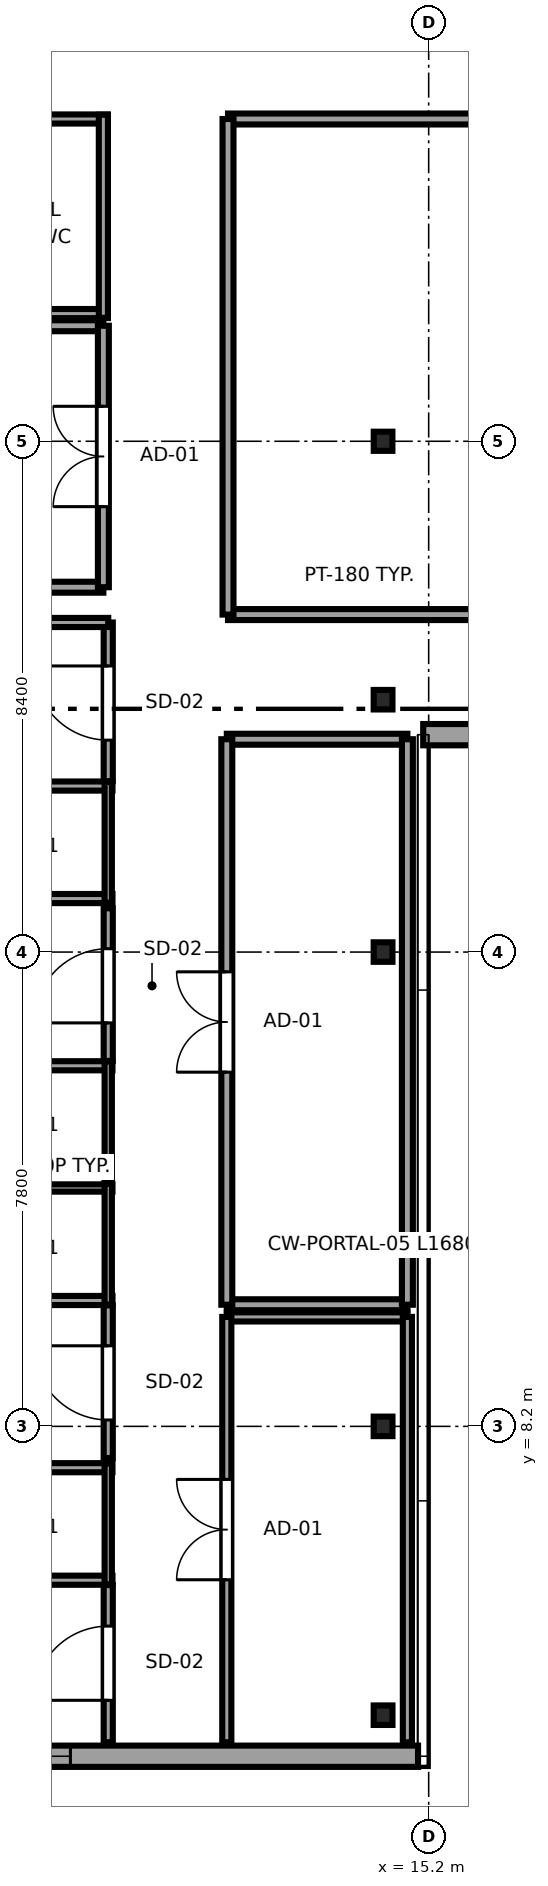
"""IFC4 building model, lengths in metres.
Left out: names, types, materials, properties, quantities, classifications, styles, units other than length and angle.
Written with IfcOpenShell. Run it as: python <this file> out.ifc"""

import sys

from ifc_helpers import new_model, si_unit, direction, frame, frame_2d, origin, origin_2d, place, context, subcontext, project, spatial, rectangle, i_section, extrude, source, transform, mapped, element, fill, save


model = new_model("IFC4")
c1 = context("Model", 3, precision=1e-05, world=origin(), true_north=direction((0.0, 1.0)))
c2 = subcontext(c1, "Body", "Model", "MODEL_VIEW")
j1 = project(units=[si_unit("LENGTHUNIT", "METRE"), si_unit("PLANEANGLEUNIT", "RADIAN")], contexts=[c1])
p1 = place(None, origin())
s1 = spatial("IfcSite", under=j1, at=p1, CompositionType="ELEMENT")
p2 = place(p1, origin())
s2 = spatial("IfcBuilding", under=s1, at=p2, CompositionType="ELEMENT")
p3 = place(p2, frame((0.0, 0.0, 248.75)))
s3 = spatial("IfcBuildingStorey", under=s2, at=p3, CompositionType="ELEMENT", Elevation=248.75)
m1 = source(origin(), c2, "Body", "SweptSolid", [
    extrude(i_section(OverallWidth=0.309, OverallDepth=0.321, WebThickness=0.014, FlangeThickness=0.022, FilletRadius=0.017, at=origin_2d()), origin(), (0.0, 0.0, 1.0), 3.55),
])
for number, where, z_axis, x_axis in (
    (1, (14.45, 3.45, 0.0), (0.0, 0.0, 1.0), (1.0, 0.0, 0.0)),
    (2, (14.45, 8.2, 0.0), (0.0, 0.0, 1.0), (1.0, 0.0, 0.0)),
    (3, (14.45, 16.0, 0.0), (0.0, 0.0, 1.0), (1.0, 0.0, 0.0)),
):
    element("IfcColumn", number, at=place(p3, frame(where, z_axis=z_axis, x_axis=x_axis)), inside=s3, PredefinedType="COLUMN", context=c2, shape_type="MappedRepresentation", body=[
        mapped(m1, transform((0.0, 0.0, 0.0), x_axis=(1.0, 0.0, 0.0), y_axis=(0.0, 1.0, 0.0), z_axis=(0.0, 0.0, 1.0), scale=1.0)),
    ])
m2 = source(origin(), c2, "Body", "SweptSolid", [
    extrude(i_section(OverallWidth=0.307, OverallDepth=0.315, WebThickness=0.012, FlangeThickness=0.019, FilletRadius=0.017, at=origin_2d()), origin(), (0.0, 0.0, 1.0), 3.55),
])
p4 = place(p3, frame((14.45, 24.4, 0.0), z_axis=(0.0, 0.0, 1.0), x_axis=(1.0, 0.0, 0.0)))
e4 = element("IfcColumn", 4, at=p4, inside=s3, PredefinedType="COLUMN", context=c2, shape_type="MappedRepresentation", body=[
    mapped(m2, transform((0.0, 0.0, 0.0), x_axis=(1.0, 0.0, 0.0), y_axis=(0.0, 1.0, 0.0), z_axis=(0.0, 0.0, 1.0), scale=1.0)),
])
p5 = place(p3, frame((14.45, 20.15, 0.0), z_axis=(0.0, 0.0, 1.0), x_axis=(1.0, 0.0, 0.0)))
e5 = element("IfcColumn", 5, at=p5, inside=s3, PredefinedType="COLUMN", context=c2, shape_type="MappedRepresentation", body=[
    mapped(m1, transform((0.0, 0.0, 0.0), x_axis=(1.0, 0.0, 0.0), y_axis=(0.0, 1.0, 0.0), z_axis=(0.0, 0.0, 1.0), scale=1.0)),
])
p6 = place(p3, frame((7.017, 2.775, 0.0), z_axis=(0.0, 0.0, 1.0), x_axis=(1.0, 0.0, 0.0)))
e6 = element("IfcWall", 6, at=p6, inside=s3, PredefinedType="SOLIDWALL", context=c2, shape_type="SweptSolid", body=[
    extrude(rectangle(XDim=8.008, YDim=0.35, at=frame_2d((4.004, 0.0))), origin(), (0.0, 0.0, 1.0), 3.37),
])
p7 = place(p6, frame((0.791, 0.0, 0.62)))
e7 = element("IfcOpeningElement", 7, at=p7, cuts=e6, PredefinedType="OPENING", context=c2, shape_type="SweptSolid", body=[
    extrude(rectangle(XDim=1.5, YDim=1.55, at=frame_2d((0.75, 0.775))), frame((0.0, 0.185, 0.0), z_axis=(0.0, -1.0, 0.0), x_axis=(1.0, 0.0, 0.0)), (0.0, 0.0, 1.0), 0.37),
])
p8 = place(p3, frame((15.11, 19.575, 0.0), z_axis=(0.0, 0.0, 1.0), x_axis=(1.0, 0.0, 0.0)))
e8 = element("IfcWall", 8, at=p8, inside=s3, PredefinedType="SOLIDWALL", context=c2, shape_type="SweptSolid", body=[
    extrude(rectangle(XDim=16.98, YDim=0.35, at=frame_2d((8.49, 0.0))), origin(), (0.0, 0.0, 1.0), 3.37),
])
p9 = place(p8, frame((1.88, 0.0, 0.68)))
e9 = element("IfcOpeningElement", 9, at=p9, cuts=e8, PredefinedType="OPENING", context=c2, shape_type="SweptSolid", body=[
    extrude(rectangle(XDim=2.7, YDim=1.95, at=frame_2d((1.35, 0.975))), frame((0.0, 0.185, 0.0), z_axis=(0.0, -1.0, 0.0), x_axis=(1.0, 0.0, 0.0)), (0.0, 0.0, 1.0), 0.37),
])
p10 = place(p8, frame((7.14, 0.0, 0.68)))
e10 = element("IfcOpeningElement", 10, at=p10, cuts=e8, PredefinedType="OPENING", context=c2, shape_type="SweptSolid", body=[
    extrude(rectangle(XDim=2.7, YDim=1.95, at=frame_2d((1.35, 0.975))), frame((0.0, 0.185, 0.0), z_axis=(0.0, -1.0, 0.0), x_axis=(1.0, 0.0, 0.0)), (0.0, 0.0, 1.0), 0.37),
])
p11 = place(p8, frame((12.4, 0.0, 0.68)))
e11 = element("IfcOpeningElement", 11, at=p11, cuts=e8, PredefinedType="OPENING", context=c2, shape_type="SweptSolid", body=[
    extrude(rectangle(XDim=2.7, YDim=1.95, at=frame_2d((1.35, 0.975))), frame((0.0, 0.185, 0.0), z_axis=(0.0, -1.0, 0.0), x_axis=(1.0, 0.0, 0.0)), (0.0, 0.0, 1.0), 0.37),
])
for number, where, z_axis, x_axis in (
    (12, (7.41, 5.67, 0.0), (0.0, 0.0, 1.0), (1.0, 0.0, 0.0)),
    (13, (7.41, 7.52, 0.0), (0.0, 0.0, 1.0), (1.0, 0.0, 0.0)),
):
    element("IfcWall", number, at=place(p3, frame(where, z_axis=z_axis, x_axis=x_axis)), inside=s3, PredefinedType="PARTITIONING", context=c2, shape_type="SweptSolid", body=[
        extrude(rectangle(XDim=2.59, YDim=0.15, at=frame_2d((1.295, 0.0))), origin(), (0.0, 0.0, 1.0), 3.37),
    ])
p12 = place(p3, frame((9.93, 5.6, 0.0), z_axis=(0.0, 0.0, 1.0), x_axis=(0.0, 1.0, 0.0)))
e14 = element("IfcWall", 14, at=p12, inside=s3, PredefinedType="PLUMBINGWALL", context=c2, shape_type="SweptSolid", body=[
    extrude(rectangle(XDim=1.99, YDim=0.12, at=frame_2d((0.995, 0.0))), origin(), (0.0, 0.0, 1.0), 3.37),
])
p13 = place(p3, frame((7.41, 10.27, 0.0), z_axis=(0.0, 0.0, 1.0), x_axis=(1.0, 0.0, 0.0)))
e15 = element("IfcWall", 15, at=p13, inside=s3, PredefinedType="PARTITIONING", context=c2, shape_type="SweptSolid", body=[
    extrude(rectangle(XDim=2.59, YDim=0.15, at=frame_2d((1.295, 0.0))), origin(), (0.0, 0.0, 1.0), 3.37),
])
p14 = place(p3, frame((7.41, 12.12, 0.0), z_axis=(0.0, 0.0, 1.0), x_axis=(1.0, 0.0, 0.0)))
e16 = element("IfcWall", 16, at=p14, inside=s3, PredefinedType="PLUMBINGWALL", context=c2, shape_type="SweptSolid", body=[
    extrude(rectangle(XDim=2.59, YDim=0.12, at=frame_2d((1.295, 0.0))), origin(), (0.0, 0.0, 1.0), 3.37),
])
p15 = place(p3, frame((9.93, 10.2, 0.0), z_axis=(0.0, 0.0, 1.0), x_axis=(0.0, 1.0, 0.0)))
e17 = element("IfcWall", 17, at=p15, inside=s3, PredefinedType="PLUMBINGWALL", context=c2, shape_type="SweptSolid", body=[
    extrude(rectangle(XDim=1.99, YDim=0.12, at=frame_2d((0.995, 0.0))), origin(), (0.0, 0.0, 1.0), 3.37),
])
p16 = place(p3, frame((7.41, 14.13, 0.0), z_axis=(0.0, 0.0, 1.0), x_axis=(1.0, 0.0, 0.0)))
e18 = element("IfcWall", 18, at=p16, inside=s3, PredefinedType="PARTITIONING", context=c2, shape_type="SweptSolid", body=[
    extrude(rectangle(XDim=2.59, YDim=0.15, at=frame_2d((1.295, 0.0))), origin(), (0.0, 0.0, 1.0), 3.37),
])
p17 = place(p3, frame((9.93, 12.21, 0.0), z_axis=(0.0, 0.0, 1.0), x_axis=(0.0, 1.0, 0.0)))
e19 = element("IfcWall", 19, at=p17, inside=s3, PredefinedType="PLUMBINGWALL", context=c2, shape_type="SweptSolid", body=[
    extrude(rectangle(XDim=1.99, YDim=0.12, at=frame_2d((0.995, 0.0))), origin(), (0.0, 0.0, 1.0), 3.37),
])
p18 = place(p3, frame((3.005, 16.88, 0.0), z_axis=(0.0, 0.0, 1.0), x_axis=(1.0, 0.0, 0.0)))
e20 = element("IfcWall", 20, at=p18, inside=s3, PredefinedType="PARTITIONING", context=c2, shape_type="SweptSolid", body=[
    extrude(rectangle(XDim=6.995, YDim=0.15, at=frame_2d((3.498, 0.0))), origin(), (0.0, 0.0, 1.0), 3.37),
])
p19 = place(p3, frame((7.41, 18.73, 0.0), z_axis=(0.0, 0.0, 1.0), x_axis=(1.0, 0.0, 0.0)))
e21 = element("IfcWall", 21, at=p19, inside=s3, PredefinedType="PARTITIONING", context=c2, shape_type="SweptSolid", body=[
    extrude(rectangle(XDim=2.59, YDim=0.15, at=frame_2d((1.295, 0.0))), origin(), (0.0, 0.0, 1.0), 3.37),
])
p20 = place(p3, frame((9.93, 16.81, 0.0), z_axis=(0.0, 0.0, 1.0), x_axis=(0.0, 1.0, 0.0)))
e22 = element("IfcWall", 22, at=p20, inside=s3, PredefinedType="PLUMBINGWALL", context=c2, shape_type="SweptSolid", body=[
    extrude(rectangle(XDim=1.99, YDim=0.12, at=frame_2d((0.995, 0.0))), origin(), (0.0, 0.0, 1.0), 3.37),
])
p21 = place(p3, frame((9.93, 3.005, 0.0), z_axis=(0.0, 0.0, 1.0), x_axis=(0.0, 1.0, 0.0)))
e23 = element("IfcWall", 23, at=p21, inside=s3, PredefinedType="PARTITIONING", context=c2, shape_type="SweptSolid", body=[
    extrude(rectangle(XDim=2.585, YDim=0.15, at=frame_2d((1.292, 0.0))), origin(), (0.0, 0.0, 1.0), 3.37),
])
p22 = place(p21, frame((0.69, 0.0, 0.0)))
e24 = element("IfcOpeningElement", 24, at=p22, cuts=e23, PredefinedType="OPENING", context=c2, shape_type="SweptSolid", body=[
    extrude(rectangle(XDim=1.22, YDim=2.08, at=frame_2d((0.61, 1.04))), frame((0.0, 0.085, 0.0), z_axis=(0.0, -1.0, 0.0), x_axis=(1.0, 0.0, 0.0)), (0.0, 0.0, 1.0), 0.17),
])
p23 = place(p3, frame((9.93, 7.68, 0.0), z_axis=(0.0, 0.0, 1.0), x_axis=(0.0, 1.0, 0.0)))
e25 = element("IfcWall", 25, at=p23, inside=s3, PredefinedType="PARTITIONING", context=c2, shape_type="SweptSolid", body=[
    extrude(rectangle(XDim=2.51, YDim=0.15, at=frame_2d((1.255, 0.0))), origin(), (0.0, 0.0, 1.0), 3.37),
])
p24 = place(p23, frame((0.625, 0.0, 0.0)))
e26 = element("IfcOpeningElement", 26, at=p24, cuts=e25, PredefinedType="OPENING", context=c2, shape_type="SweptSolid", body=[
    extrude(rectangle(XDim=1.22, YDim=2.08, at=frame_2d((0.61, 1.04))), frame((0.0, 0.085, 0.0), z_axis=(0.0, -1.0, 0.0), x_axis=(1.0, 0.0, 0.0)), (0.0, 0.0, 1.0), 0.17),
])
p25 = place(p3, frame((9.93, 14.21, 0.0), z_axis=(0.0, 0.0, 1.0), x_axis=(0.0, 1.0, 0.0)))
e27 = element("IfcWall", 27, at=p25, inside=s3, PredefinedType="PARTITIONING", context=c2, shape_type="SweptSolid", body=[
    extrude(rectangle(XDim=2.51, YDim=0.15, at=frame_2d((1.255, 0.0))), origin(), (0.0, 0.0, 1.0), 3.37),
])
p26 = place(p25, frame((0.625, 0.0, 0.0)))
e28 = element("IfcOpeningElement", 28, at=p26, cuts=e27, PredefinedType="OPENING", context=c2, shape_type="SweptSolid", body=[
    extrude(rectangle(XDim=1.22, YDim=2.08, at=frame_2d((0.61, 1.04))), frame((0.0, 0.085, 0.0), z_axis=(0.0, -1.0, 0.0), x_axis=(1.0, 0.0, 0.0)), (0.0, 0.0, 1.0), 0.17),
])
p27 = place(p3, frame((9.93, 18.81, 0.0), z_axis=(0.0, 0.0, 1.0), x_axis=(0.0, 1.0, 0.0)))
e29 = element("IfcWall", 29, at=p27, inside=s3, PredefinedType="PARTITIONING", context=c2, shape_type="SweptSolid", body=[
    extrude(rectangle(XDim=2.61, YDim=0.15, at=frame_2d((1.305, 0.0))), origin(), (0.0, 0.0, 1.0), 3.37),
])
p28 = place(p27, frame((0.675, 0.0, 0.0)))
e30 = element("IfcOpeningElement", 30, at=p28, cuts=e29, PredefinedType="OPENING", context=c2, shape_type="SweptSolid", body=[
    extrude(rectangle(XDim=1.22, YDim=2.08, at=frame_2d((0.61, 1.04))), frame((0.0, 0.085, 0.0), z_axis=(0.0, -1.0, 0.0), x_axis=(1.0, 0.0, 0.0)), (0.0, 0.0, 1.0), 0.17),
])
p29 = place(p3, frame((3.005, 21.42, 0.0), z_axis=(0.0, 0.0, 1.0), x_axis=(1.0, 0.0, 0.0)))
e31 = element("IfcWall", 31, at=p29, inside=s3, PredefinedType="PARTITIONING", context=c2, shape_type="SweptSolid", body=[
    extrude(rectangle(XDim=6.925, YDim=0.15, at=frame_2d((3.462, 0.0))), origin(), (0.0, 0.0, 1.0), 3.37),
])
for number, where, z_axis, x_axis in (
    (32, (11.88, 10.2, 0.0), (0.0, 0.0, 1.0), (1.0, 0.0, 0.0)),
    (33, (11.88, 19.5, 0.0), (0.0, 0.0, 1.0), (1.0, 0.0, 0.0)),
):
    element("IfcWall", number, at=place(p3, frame(where, z_axis=z_axis, x_axis=x_axis)), inside=s3, PredefinedType="PARTITIONING", context=c2, shape_type="SweptSolid", body=[
        extrude(rectangle(XDim=2.97, YDim=0.18, at=frame_2d((1.485, 0.0))), origin(), (0.0, 0.0, 1.0), 3.37),
    ])
p30 = place(p3, frame((11.88, 10.2, 0.0), z_axis=(0.0, 0.0, 1.0), x_axis=(0.0, 1.0, 0.0)))
e34 = element("IfcWall", 34, at=p30, inside=s3, PredefinedType="PARTITIONING", context=c2, shape_type="SweptSolid", body=[
    extrude(rectangle(XDim=9.3, YDim=0.18, at=frame_2d((4.65, 0.0))), origin(), (0.0, 0.0, 1.0), 3.37),
])
p31 = place(p30, frame((3.825, 0.0, 0.0)))
e35 = element("IfcOpeningElement", 35, at=p31, cuts=e34, PredefinedType="OPENING", context=c2, shape_type="SweptSolid", body=[
    extrude(rectangle(XDim=1.65, YDim=2.15, at=frame_2d((0.825, 1.075))), frame((0.0, 0.1, 0.0), z_axis=(0.0, -1.0, 0.0), x_axis=(1.0, 0.0, 0.0)), (0.0, 0.0, 1.0), 0.2),
])
p32 = place(p3, frame((14.85, 10.2, 0.0), z_axis=(0.0, 0.0, 1.0), x_axis=(0.0, 1.0, 0.0)))
e36 = element("IfcWall", 36, at=p32, inside=s3, PredefinedType="PARTITIONING", context=c2, shape_type="SweptSolid", body=[
    extrude(rectangle(XDim=9.3, YDim=0.18, at=frame_2d((4.65, 0.0))), origin(), (0.0, 0.0, 1.0), 3.37),
])
p33 = place(p3, frame((11.88, 10.0, 0.0), z_axis=(0.0, 0.0, 1.0), x_axis=(1.0, 0.0, 0.0)))
e37 = element("IfcWall", 37, at=p33, inside=s3, PredefinedType="PARTITIONING", context=c2, shape_type="SweptSolid", body=[
    extrude(rectangle(XDim=2.97, YDim=0.15, at=frame_2d((1.485, 0.0))), origin(), (0.0, 0.0, 1.0), 3.37),
])
p34 = place(p3, frame((11.88, 3.005, 0.0), z_axis=(0.0, 0.0, 1.0), x_axis=(0.0, 1.0, 0.0)))
e38 = element("IfcWall", 38, at=p34, inside=s3, PredefinedType="PARTITIONING", context=c2, shape_type="SweptSolid", body=[
    extrude(rectangle(XDim=6.995, YDim=0.15, at=frame_2d((3.498, 0.0))), origin(), (0.0, 0.0, 1.0), 3.37),
])
p35 = place(p34, frame((2.673, 0.0, 0.0)))
e39 = element("IfcOpeningElement", 39, at=p35, cuts=e38, PredefinedType="OPENING", context=c2, shape_type="SweptSolid", body=[
    extrude(rectangle(XDim=1.65, YDim=2.15, at=frame_2d((0.825, 1.075))), frame((0.0, 0.085, 0.0), z_axis=(0.0, -1.0, 0.0), x_axis=(1.0, 0.0, 0.0)), (0.0, 0.0, 1.0), 0.17),
])
p36 = place(p3, frame((14.85, 3.005, 0.0), z_axis=(0.0, 0.0, 1.0), x_axis=(0.0, 1.0, 0.0)))
e40 = element("IfcWall", 40, at=p36, inside=s3, PredefinedType="PARTITIONING", context=c2, shape_type="SweptSolid", body=[
    extrude(rectangle(XDim=6.995, YDim=0.15, at=frame_2d((3.498, 0.0))), origin(), (0.0, 0.0, 1.0), 3.37),
])
p37 = place(p3, frame((11.9, 21.55, 0.0), z_axis=(0.0, 0.0, 1.0), x_axis=(1.0, 0.0, 0.0)))
e41 = element("IfcWall", 41, at=p37, inside=s3, PredefinedType="PARTITIONING", context=c2, shape_type="SweptSolid", body=[
    extrude(rectangle(XDim=10.3, YDim=0.18, at=frame_2d((5.15, 0.0))), origin(), (0.0, 0.0, 1.0), 3.37),
])
p38 = place(p37, frame((4.325, 0.0, 0.0)))
e42 = element("IfcOpeningElement", 42, at=p38, cuts=e41, PredefinedType="OPENING", context=c2, shape_type="SweptSolid", body=[
    extrude(rectangle(XDim=1.65, YDim=2.15, at=frame_2d((0.825, 1.075))), frame((0.0, 0.1, 0.0), z_axis=(0.0, -1.0, 0.0), x_axis=(1.0, 0.0, 0.0)), (0.0, 0.0, 1.0), 0.2),
])
p39 = place(p3, frame((11.9, 29.7, 0.0), z_axis=(0.0, 0.0, 1.0), x_axis=(1.0, 0.0, 0.0)))
e43 = element("IfcWall", 43, at=p39, inside=s3, PredefinedType="PARTITIONING", context=c2, shape_type="SweptSolid", body=[
    extrude(rectangle(XDim=10.3, YDim=0.18, at=frame_2d((5.15, 0.0))), origin(), (0.0, 0.0, 1.0), 3.37),
])
p40 = place(p3, frame((11.9, 21.55, 0.0), z_axis=(0.0, 0.0, 1.0), x_axis=(0.0, 1.0, 0.0)))
e44 = element("IfcWall", 44, at=p40, inside=s3, PredefinedType="PARTITIONING", context=c2, shape_type="SweptSolid", body=[
    extrude(rectangle(XDim=8.15, YDim=0.18, at=frame_2d((4.075, 0.0))), origin(), (0.0, 0.0, 1.0), 3.37),
])
for number, where, z_axis, x_axis in (
    (45, (3.005, 22.0, 0.0), (0.0, 0.0, 1.0), (1.0, 0.0, 0.0)),
    (46, (3.005, 26.3, 0.0), (0.0, 0.0, 1.0), (1.0, 0.0, 0.0)),
):
    element("IfcWall", number, at=place(p3, frame(where, z_axis=z_axis, x_axis=x_axis)), inside=s3, PredefinedType="PARTITIONING", context=c2, shape_type="SweptSolid", body=[
        extrude(rectangle(XDim=6.845, YDim=0.18, at=frame_2d((3.423, 0.0))), origin(), (0.0, 0.0, 1.0), 3.37),
    ])
p41 = place(p3, frame((9.85, 22.0, 0.0), z_axis=(0.0, 0.0, 1.0), x_axis=(0.0, 1.0, 0.0)))
e47 = element("IfcWall", 47, at=p41, inside=s3, PredefinedType="PARTITIONING", context=c2, shape_type="SweptSolid", body=[
    extrude(rectangle(XDim=4.3, YDim=0.18, at=frame_2d((2.15, 0.0))), origin(), (0.0, 0.0, 1.0), 3.37),
])
p42 = place(p41, frame((1.325, 0.0, 0.0)))
e48 = element("IfcOpeningElement", 48, at=p42, cuts=e47, PredefinedType="OPENING", context=c2, shape_type="SweptSolid", body=[
    extrude(rectangle(XDim=1.65, YDim=2.15, at=frame_2d((0.825, 1.075))), frame((0.0, 0.1, 0.0), z_axis=(0.0, -1.0, 0.0), x_axis=(1.0, 0.0, 0.0)), (0.0, 0.0, 1.0), 0.2),
])
p43 = place(p3, frame((6.13, 26.5, 0.0), z_axis=(0.0, 0.0, 1.0), x_axis=(1.0, 0.0, 0.0)))
e49 = element("IfcWall", 49, at=p43, inside=s3, PredefinedType="PARTITIONING", context=c2, shape_type="SweptSolid", body=[
    extrude(rectangle(XDim=3.79, YDim=0.15, at=frame_2d((1.895, 0.0))), origin(), (0.0, 0.0, 1.0), 3.37),
])
p44 = place(p3, frame((6.13, 29.7, 0.0), z_axis=(0.0, 0.0, 1.0), x_axis=(1.0, 0.0, 0.0)))
e50 = element("IfcWall", 50, at=p44, inside=s3, PredefinedType="PARTITIONING", context=c2, shape_type="SweptSolid", body=[
    extrude(rectangle(XDim=3.79, YDim=0.15, at=frame_2d((1.895, 0.0))), origin(), (0.0, 0.0, 1.0), 3.37),
])
p45 = place(p44, frame((1.435, 0.0, 0.0)))
e51 = element("IfcOpeningElement", 51, at=p45, cuts=e50, PredefinedType="OPENING", context=c2, shape_type="SweptSolid", body=[
    extrude(rectangle(XDim=0.92, YDim=2.01, at=frame_2d((0.46, 1.005))), frame((0.0, 0.085, 0.0), z_axis=(0.0, -1.0, 0.0), x_axis=(1.0, 0.0, 0.0)), (0.0, 0.0, 1.0), 0.17),
])
p46 = place(p3, frame((9.85, 26.43, 0.0), z_axis=(0.0, 0.0, 1.0), x_axis=(0.0, 1.0, 0.0)))
e52 = element("IfcWall", 52, at=p46, inside=s3, PredefinedType="PARTITIONING", context=c2, shape_type="SweptSolid", body=[
    extrude(rectangle(XDim=3.34, YDim=0.15, at=frame_2d((1.67, 0.0))), origin(), (0.0, 0.0, 1.0), 3.37),
])
m3 = source(origin(), c2, "Body", "SweptSolid", [
    extrude(rectangle(XDim=1.5, YDim=1.55, at=frame_2d((0.75, 0.775))), frame((0.0, 0.09, 0.0), z_axis=(0.0, -1.0, 0.0), x_axis=(1.0, 0.0, 0.0)), (0.0, 0.0, 1.0), 0.06),
])
p47 = place(p7, origin())
e53 = element("IfcWindow", 53, at=p47, inside=s3, PartitioningType="SINGLE_PANEL", PredefinedType="WINDOW", context=c2, shape_type="MappedRepresentation", body=[
    mapped(m3, transform((0.0, 0.0, 0.0), x_axis=(1.0, 0.0, 0.0), y_axis=(0.0, 1.0, 0.0), z_axis=(0.0, 0.0, 1.0), scale=1.0)),
])
fill(e7, e53)
m4 = source(origin(), c2, "Body", "SweptSolid", [
    extrude(rectangle(XDim=1.22, YDim=2.08, at=frame_2d((0.61, 1.04))), frame((0.0, 0.025, 0.0), z_axis=(0.0, -1.0, 0.0), x_axis=(1.0, 0.0, 0.0)), (0.0, 0.0, 1.0), 0.05),
])
p48 = place(p22, origin())
e54 = element("IfcDoor", 54, at=p48, inside=s3, OperationType="SINGLE_SWING_LEFT", PredefinedType="DOOR", context=c2, shape_type="MappedRepresentation", body=[
    mapped(m4, transform((0.0, 0.0, 0.0), x_axis=(1.0, 0.0, 0.0), y_axis=(0.0, 1.0, 0.0), z_axis=(0.0, 0.0, 1.0), scale=1.0)),
])
fill(e24, e54)
p49 = place(p24, origin())
e55 = element("IfcDoor", 55, at=p49, inside=s3, OperationType="SINGLE_SWING_RIGHT", PredefinedType="DOOR", context=c2, shape_type="MappedRepresentation", body=[
    mapped(m4, transform((0.0, 0.0, 0.0), x_axis=(1.0, 0.0, 0.0), y_axis=(0.0, 1.0, 0.0), z_axis=(0.0, 0.0, 1.0), scale=1.0)),
])
fill(e26, e55)
p50 = place(p26, origin())
e56 = element("IfcDoor", 56, at=p50, inside=s3, OperationType="SINGLE_SWING_LEFT", PredefinedType="DOOR", context=c2, shape_type="MappedRepresentation", body=[
    mapped(m4, transform((0.0, 0.0, 0.0), x_axis=(1.0, 0.0, 0.0), y_axis=(0.0, 1.0, 0.0), z_axis=(0.0, 0.0, 1.0), scale=1.0)),
])
fill(e28, e56)
p51 = place(p28, origin())
e57 = element("IfcDoor", 57, at=p51, inside=s3, OperationType="SINGLE_SWING_RIGHT", PredefinedType="DOOR", context=c2, shape_type="MappedRepresentation", body=[
    mapped(m4, transform((0.0, 0.0, 0.0), x_axis=(1.0, 0.0, 0.0), y_axis=(0.0, 1.0, 0.0), z_axis=(0.0, 0.0, 1.0), scale=1.0)),
])
fill(e30, e57)
m5 = source(origin(), c2, "Body", "SweptSolid", [
    extrude(rectangle(XDim=1.65, YDim=2.15, at=frame_2d((0.825, 1.075))), frame((0.0, 0.025, 0.0), z_axis=(0.0, -1.0, 0.0), x_axis=(1.0, 0.0, 0.0)), (0.0, 0.0, 1.0), 0.05),
])
p52 = place(p31, origin())
e58 = element("IfcDoor", 58, at=p52, inside=s3, OperationType="DOUBLE_DOOR_SINGLE_SWING", PredefinedType="DOOR", context=c2, shape_type="MappedRepresentation", body=[
    mapped(m5, transform((0.0, 0.0, 0.0), x_axis=(1.0, 0.0, 0.0), y_axis=(0.0, 1.0, 0.0), z_axis=(0.0, 0.0, 1.0), scale=1.0)),
])
fill(e35, e58)
p53 = place(p35, origin())
e59 = element("IfcDoor", 59, at=p53, inside=s3, OperationType="DOUBLE_DOOR_SINGLE_SWING", PredefinedType="DOOR", context=c2, shape_type="MappedRepresentation", body=[
    mapped(m5, transform((0.0, 0.0, 0.0), x_axis=(1.0, 0.0, 0.0), y_axis=(0.0, 1.0, 0.0), z_axis=(0.0, 0.0, 1.0), scale=1.0)),
])
fill(e39, e59)
p54 = place(p42, origin())
e60 = element("IfcDoor", 60, at=p54, inside=s3, OperationType="DOUBLE_DOOR_SINGLE_SWING", PredefinedType="DOOR", context=c2, shape_type="MappedRepresentation", body=[
    mapped(m5, transform((0.0, 0.0, 0.0), x_axis=(1.0, 0.0, 0.0), y_axis=(0.0, 1.0, 0.0), z_axis=(0.0, 0.0, 1.0), scale=1.0)),
])
fill(e48, e60)
save(model, sys.argv[1])
